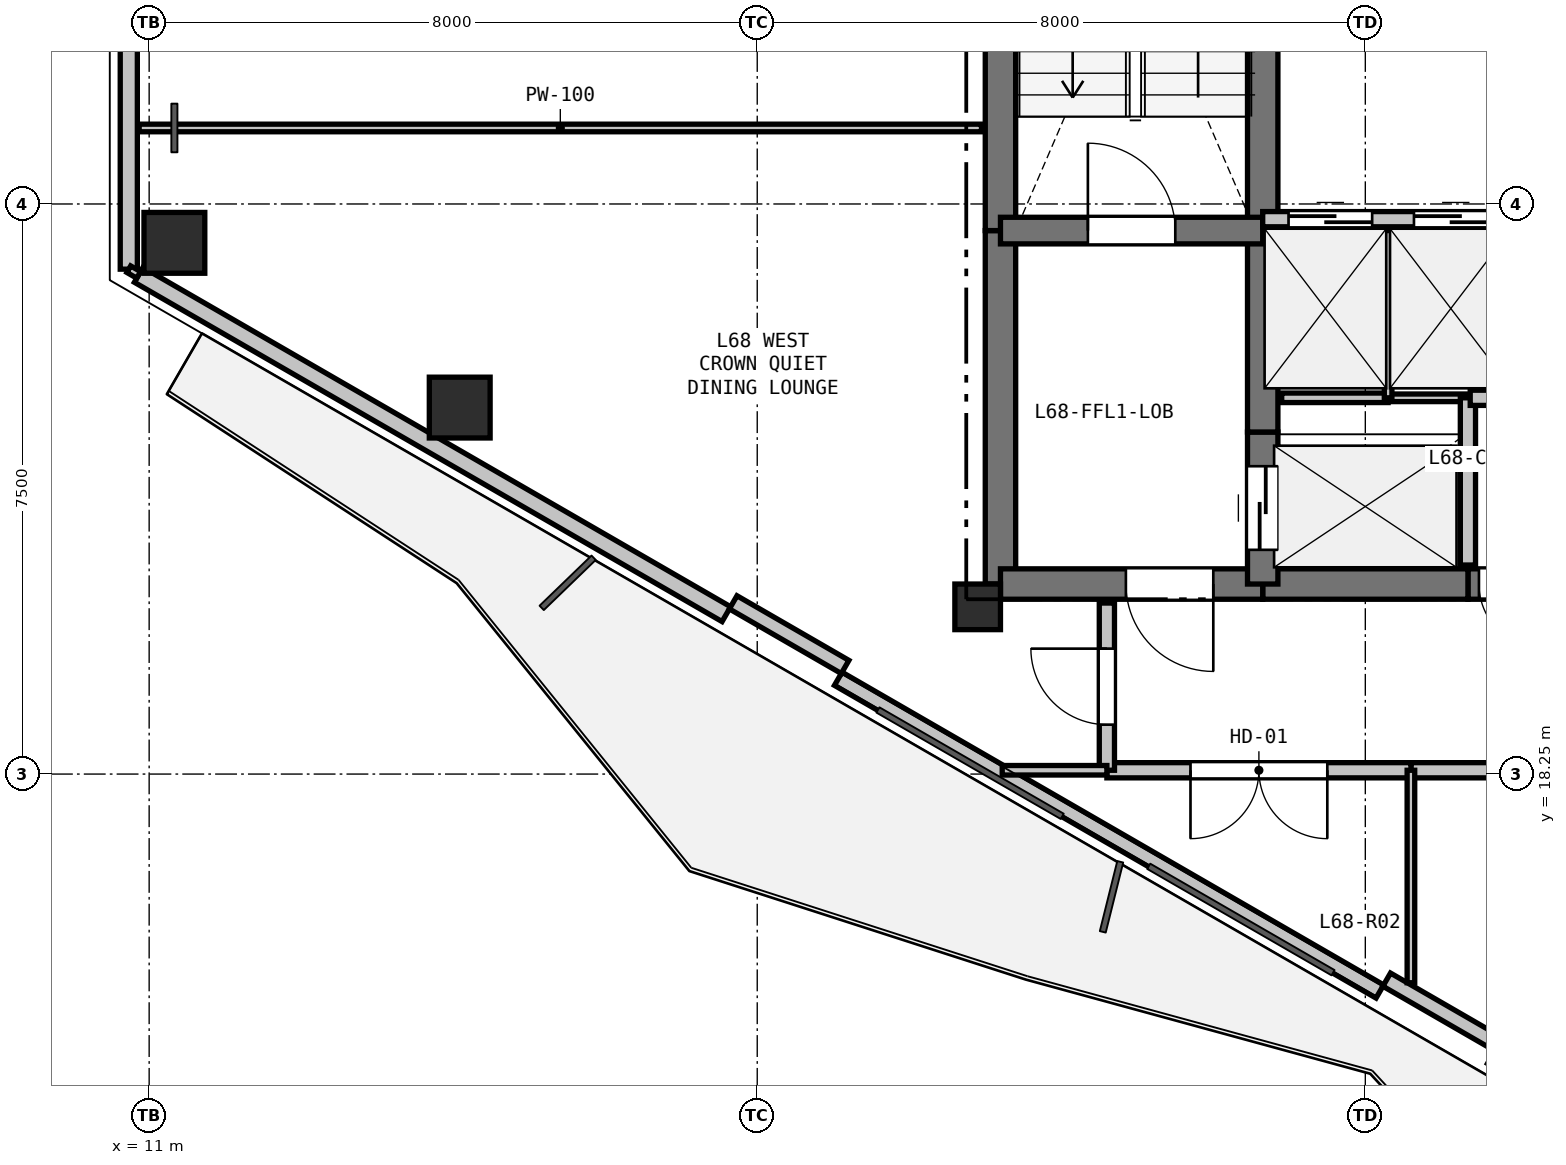
"""IFC4 building model, lengths in metres.
Left out: names, types, materials, properties, quantities, classifications, styles, units other than length and angle.
Written with IfcOpenShell. Run it as: python <this file> out.ifc"""

import sys

from ifc_helpers import new_model, si_unit, direction, frame, frame_2d, origin, origin_2d, place, context, subcontext, project, spatial, rectangle, hollow_rectangle, extrude, element, fill, save


model = new_model("IFC4")
c1 = context("Model", 3, precision=1e-05, world=origin(), true_north=direction((0.0, 1.0)))
c2 = subcontext(c1, "Body", "Model", "MODEL_VIEW")
j1 = project(units=[si_unit("LENGTHUNIT", "METRE"), si_unit("PLANEANGLEUNIT", "RADIAN")], contexts=[c1])
p1 = place(None, origin())
s1 = spatial("IfcSite", under=j1, at=p1, CompositionType="ELEMENT")
p2 = place(p1, origin())
s2 = spatial("IfcBuilding", under=s1, at=p2, CompositionType="ELEMENT")
p3 = place(p2, frame((0.0, 0.0, 243.0)))
s3 = spatial("IfcBuildingStorey", under=s2, at=p3, CompositionType="ELEMENT", Elevation=243.0)
p4 = place(p3, frame((21.9, 20.45, 0.0), z_axis=(0.0, 0.0, 1.0), x_axis=(1.0, 0.0, 0.0)))
e1 = element("IfcColumn", 1, at=p4, inside=s3, PredefinedType="COLUMN", context=c2, shape_type="SweptSolid", body=[
    extrude(rectangle(XDim=0.6, YDim=0.6, at=origin_2d()), origin(), (0.0, 0.0, 1.0), 3.3),
])
for number, where, z_axis, x_axis in (
    (2, (15.086, 23.072, 0.0), (0.0, 0.0, 1.0), (1.0, 0.0, 0.0)),
    (3, (11.332, 25.239, 0.0), (0.0, 0.0, 1.0), (1.0, 0.0, 0.0)),
):
    element("IfcColumn", number, at=place(p3, frame(where, z_axis=z_axis, x_axis=x_axis)), inside=s3, PredefinedType="COLUMN", context=c2, shape_type="SweptSolid", body=[
        extrude(hollow_rectangle(XDim=0.8, YDim=0.8, WallThickness=0.025, at=origin_2d()), origin(), (0.0, 0.0, 1.0), 3.3),
    ])
p5 = place(p3, frame((10.732, 24.892, 0.0), z_axis=(0.0, 0.0, 1.0), x_axis=(0.0, 1.0, 0.0)))
e4 = element("IfcWall", 4, at=p5, inside=s3, PredefinedType="SOLIDWALL", context=c2, shape_type="SweptSolid", body=[
    extrude(rectangle(XDim=3.715, YDim=0.225, at=frame_2d((1.858, 0.0))), origin(), (0.0, 0.0, 1.0), 2.7),
])
p6 = place(p3, frame((27.191, 15.389, 0.0), z_axis=(0.0, 0.0, 1.0), x_axis=(-0.866019557082, 0.500010126649, 0.0)))
e5 = element("IfcWall", 5, at=p6, inside=s3, PredefinedType="PARAPET", context=c2, shape_type="SweptSolid", body=[
    extrude(rectangle(XDim=8.228, YDim=0.2, at=frame_2d((4.114, 0.0))), origin(), (0.0, 0.0, 1.0), 0.2),
])
p7 = place(p3, frame((18.594, 20.354, 0.0), z_axis=(0.0, 0.0, 1.0), x_axis=(-0.866026655105, 0.499997832642, 0.0)))
e6 = element("IfcWall", 6, at=p7, inside=s3, PredefinedType="SOLIDWALL", context=c2, shape_type="SweptSolid", body=[
    extrude(rectangle(XDim=8.928, YDim=0.225, at=frame_2d((4.464, 0.0))), origin(), (0.0, 0.0, 1.0), 2.7),
])
for number, where, z_axis, x_axis in (
    (7, (28.754, 14.695, 0.0), (0.0, 0.0, 1.0), (-0.866, 0.5, 0.0)),
    (8, (20.156, 19.659, 0.0), (0.0, 0.0, 1.0), (-0.866, 0.5, 0.0)),
):
    element("IfcWall", number, at=place(p3, frame(where, z_axis=z_axis, x_axis=x_axis)), inside=s3, PredefinedType="PARAPET", context=c2, shape_type="SweptSolid", body=[
        extrude(rectangle(XDim=1.7, YDim=0.2, at=frame_2d((0.85, 0.0))), origin(), (0.0, 0.0, 1.0), 2.7),
    ])
p8 = place(p3, frame((22.2, 20.75, 0.0), z_axis=(0.0, 0.0, 1.0), x_axis=(0.0, 1.0, 0.0)))
e9 = element("IfcWall", 9, at=p8, inside=s3, PredefinedType="SHEAR", context=c2, shape_type="SweptSolid", body=[
    extrude(rectangle(XDim=4.65, YDim=0.4, at=frame_2d((2.325, 0.0))), origin(), (0.0, 0.0, 1.0), 3.08),
])
p9 = place(p3, frame((22.2, 25.4, 0.0), z_axis=(0.0, 0.0, 1.0), x_axis=(0.0, 1.0, 0.0)))
e10 = element("IfcWall", 10, at=p9, inside=s3, PredefinedType="SHEAR", context=c2, shape_type="SweptSolid", body=[
    extrude(rectangle(XDim=7.35, YDim=0.4, at=frame_2d((3.675, 0.0))), origin(), (0.0, 0.0, 1.0), 3.08),
])
p10 = place(p3, frame((30.6, 20.75, 0.0), z_axis=(0.0, 0.0, 1.0), x_axis=(-1.0, 0.0, 0.0)))
e11 = element("IfcWall", 11, at=p10, inside=s3, PredefinedType="SHEAR", context=c2, shape_type="SweptSolid", body=[
    extrude(rectangle(XDim=2.25, YDim=0.4, at=frame_2d((1.125, 0.0))), origin(), (0.0, 0.0, 1.0), 3.08),
])
p11 = place(p10, frame((1.255, 0.0, 0.0)))
e12 = element("IfcOpeningElement", 12, at=p11, cuts=e11, PredefinedType="OPENING", context=c2, shape_type="SweptSolid", body=[
    extrude(rectangle(XDim=0.85, YDim=2.1, at=frame_2d((0.425, 1.05))), frame((0.0, 0.21, 0.0), z_axis=(0.0, -1.0, 0.0), x_axis=(1.0, 0.0, 0.0)), (0.0, 0.0, 1.0), 0.42),
])
p12 = place(p10, frame((0.17, 0.0, 0.0)))
e13 = element("IfcOpeningElement", 13, at=p12, cuts=e11, PredefinedType="OPENING", context=c2, shape_type="SweptSolid", body=[
    extrude(rectangle(XDim=0.85, YDim=2.1, at=frame_2d((0.425, 1.05))), frame((0.0, 0.21, 0.0), z_axis=(0.0, -1.0, 0.0), x_axis=(1.0, 0.0, 0.0)), (0.0, 0.0, 1.0), 0.42),
])
p13 = place(p3, frame((28.35, 20.75, 0.0), z_axis=(0.0, 0.0, 1.0), x_axis=(-1.0, 0.0, 0.0)))
e14 = element("IfcWall", 14, at=p13, inside=s3, PredefinedType="SHEAR", context=c2, shape_type="SweptSolid", body=[
    extrude(rectangle(XDim=2.7, YDim=0.4, at=frame_2d((1.35, 0.0))), origin(), (0.0, 0.0, 1.0), 3.08),
])
p14 = place(p3, frame((25.65, 20.75, 0.0), z_axis=(0.0, 0.0, 1.0), x_axis=(-1.0, 0.0, 0.0)))
e15 = element("IfcWall", 15, at=p14, inside=s3, PredefinedType="SHEAR", context=c2, shape_type="SweptSolid", body=[
    extrude(rectangle(XDim=3.45, YDim=0.4, at=frame_2d((1.725, 0.0))), origin(), (0.0, 0.0, 1.0), 3.08),
])
p15 = place(p14, frame((0.65, 0.0, 0.0)))
e16 = element("IfcOpeningElement", 16, at=p15, cuts=e15, PredefinedType="OPENING", context=c2, shape_type="SweptSolid", body=[
    extrude(rectangle(XDim=1.15, YDim=2.15, at=frame_2d((0.575, 1.075))), frame((0.0, 0.21, 0.0), z_axis=(0.0, -1.0, 0.0), x_axis=(1.0, 0.0, 0.0)), (0.0, 0.0, 1.0), 0.42),
])
p16 = place(p3, frame((25.65, 20.75, 0.0), z_axis=(0.0, 0.0, 1.0), x_axis=(0.0, 1.0, 0.0)))
e17 = element("IfcWall", 17, at=p16, inside=s3, PredefinedType="SHEAR", context=c2, shape_type="SweptSolid", body=[
    extrude(rectangle(XDim=2.0, YDim=0.4, at=frame_2d((1.0, 0.0))), origin(), (0.0, 0.0, 1.0), 3.08),
])
p17 = place(p16, frame((0.45, 0.0, 0.0)))
e18 = element("IfcOpeningElement", 18, at=p17, cuts=e17, PredefinedType="OPENING", context=c2, shape_type="SweptSolid", body=[
    extrude(rectangle(XDim=1.1, YDim=2.15, at=frame_2d((0.55, 1.075))), frame((0.0, 0.21, 0.0), z_axis=(0.0, -1.0, 0.0), x_axis=(1.0, 0.0, 0.0)), (0.0, 0.0, 1.0), 0.42),
])
p18 = place(p3, frame((25.65, 22.75, 0.0), z_axis=(0.0, 0.0, 1.0), x_axis=(0.0, 1.0, 0.0)))
e19 = element("IfcWall", 19, at=p18, inside=s3, PredefinedType="SHEAR", context=c2, shape_type="SweptSolid", body=[
    extrude(rectangle(XDim=2.8, YDim=0.4, at=frame_2d((1.4, 0.0))), origin(), (0.0, 0.0, 1.0), 3.08),
])
p19 = place(p3, frame((25.65, 25.55, 0.0), z_axis=(0.0, 0.0, 1.0), x_axis=(0.0, 1.0, 0.0)))
e20 = element("IfcWall", 20, at=p19, inside=s3, PredefinedType="SHEAR", context=c2, shape_type="SweptSolid", body=[
    extrude(rectangle(XDim=2.4, YDim=0.4, at=frame_2d((1.2, 0.0))), origin(), (0.0, 0.0, 1.0), 3.08),
])
p20 = place(p3, frame((22.2, 25.4, 0.0), z_axis=(0.0, 0.0, 1.0), x_axis=(1.0, 0.0, 0.0)))
e21 = element("IfcWall", 21, at=p20, inside=s3, PredefinedType="SHEAR", context=c2, shape_type="SweptSolid", body=[
    extrude(rectangle(XDim=3.45, YDim=0.35, at=frame_2d((1.725, 0.0))), origin(), (0.0, 0.0, 1.0), 3.08),
])
p21 = place(p20, frame((1.15, 0.0, 0.0)))
e22 = element("IfcOpeningElement", 22, at=p21, cuts=e21, PredefinedType="OPENING", context=c2, shape_type="SweptSolid", body=[
    extrude(rectangle(XDim=1.15, YDim=2.15, at=frame_2d((0.575, 1.075))), frame((0.0, 0.185, 0.0), z_axis=(0.0, -1.0, 0.0), x_axis=(1.0, 0.0, 0.0)), (0.0, 0.0, 1.0), 0.37),
])
p22 = place(p3, frame((25.65, 25.55, 0.0), z_axis=(0.0, 0.0, 1.0), x_axis=(1.0, 0.0, 0.0)))
e23 = element("IfcWall", 23, at=p22, inside=s3, PredefinedType="PARTITIONING", context=c2, shape_type="SweptSolid", body=[
    extrude(rectangle(XDim=4.95, YDim=0.2, at=frame_2d((2.475, 0.0))), origin(), (0.0, 0.0, 1.0), 3.08),
])
p23 = place(p22, frame((0.34, 0.0, 0.0)))
e24 = element("IfcOpeningElement", 24, at=p23, cuts=e23, PredefinedType="OPENING", context=c2, shape_type="SweptSolid", body=[
    extrude(rectangle(XDim=1.1, YDim=2.15, at=frame_2d((0.55, 1.075))), frame((0.0, 0.11, 0.0), z_axis=(0.0, -1.0, 0.0), x_axis=(1.0, 0.0, 0.0)), (0.0, 0.0, 1.0), 0.22),
])
p24 = place(p22, frame((1.99, 0.0, 0.0)))
e25 = element("IfcOpeningElement", 25, at=p24, cuts=e23, PredefinedType="OPENING", context=c2, shape_type="SweptSolid", body=[
    extrude(rectangle(XDim=1.1, YDim=2.15, at=frame_2d((0.55, 1.075))), frame((0.0, 0.11, 0.0), z_axis=(0.0, -1.0, 0.0), x_axis=(1.0, 0.0, 0.0)), (0.0, 0.0, 1.0), 0.22),
])
p25 = place(p22, frame((3.64, 0.0, 0.0)))
e26 = element("IfcOpeningElement", 26, at=p25, cuts=e23, PredefinedType="OPENING", context=c2, shape_type="SweptSolid", body=[
    extrude(rectangle(XDim=1.1, YDim=2.15, at=frame_2d((0.55, 1.075))), frame((0.0, 0.11, 0.0), z_axis=(0.0, -1.0, 0.0), x_axis=(1.0, 0.0, 0.0)), (0.0, 0.0, 1.0), 0.22),
])
p26 = place(p3, frame((25.9, 23.2, 0.0), z_axis=(0.0, 0.0, 1.0), x_axis=(1.0, 0.0, 0.0)))
e27 = element("IfcWall", 27, at=p26, inside=s3, PredefinedType="PARTITIONING", context=c2, shape_type="SweptSolid", body=[
    extrude(rectangle(XDim=1.4, YDim=0.125, at=frame_2d((0.7, 0.0))), origin(), (0.0, 0.0, 1.0), 3.08),
])
p27 = place(p3, frame((27.3, 23.2, 0.0), z_axis=(0.0, 0.0, 1.0), x_axis=(1.0, 0.0, 0.0)))
e28 = element("IfcWall", 28, at=p27, inside=s3, PredefinedType="PARTITIONING", context=c2, shape_type="SweptSolid", body=[
    extrude(rectangle(XDim=1.05, YDim=0.1, at=frame_2d((0.525, 0.0))), origin(), (0.0, 0.0, 1.0), 3.08),
])
p28 = place(p3, frame((28.35, 23.2, 0.0), z_axis=(0.0, 0.0, 1.0), x_axis=(0.0, -1.0, 0.0)))
e29 = element("IfcWall", 29, at=p28, inside=s3, PredefinedType="PARTITIONING", context=c2, shape_type="SweptSolid", body=[
    extrude(rectangle(XDim=2.2, YDim=0.2, at=frame_2d((1.1, 0.0))), origin(), (0.0, 0.0, 1.0), 3.08),
])
p29 = place(p3, frame((27.3, 25.4, 0.0), z_axis=(0.0, 0.0, 1.0), x_axis=(0.0, -1.0, 0.0)))
e30 = element("IfcWall", 30, at=p29, inside=s3, PredefinedType="PARTITIONING", context=c2, shape_type="SweptSolid", body=[
    extrude(rectangle(XDim=2.2, YDim=0.1, at=frame_2d((1.1, 0.0))), origin(), (0.0, 0.0, 1.0), 3.08),
])
p30 = place(p3, frame((28.95, 23.2, 0.0), z_axis=(0.0, 0.0, 1.0), x_axis=(-1.0, 0.0, 0.0)))
e31 = element("IfcWall", 31, at=p30, inside=s3, PredefinedType="PARTITIONING", context=c2, shape_type="SweptSolid", body=[
    extrude(rectangle(XDim=0.57, YDim=0.2, at=frame_2d((0.285, 0.0))), origin(), (0.0, 0.0, 1.0), 3.08),
])
p31 = place(p3, frame((33.5, 18.3, 0.0), z_axis=(0.0, 0.0, 1.0), x_axis=(-1.0, 0.0, 0.0)))
e32 = element("IfcWall", 32, at=p31, inside=s3, PredefinedType="PARTITIONING", context=c2, shape_type="SweptSolid", body=[
    extrude(rectangle(XDim=5.9, YDim=0.2, at=frame_2d((2.95, 0.0))), origin(), (0.0, 0.0, 1.0), 3.08),
])
p32 = place(p31, frame((2.45, 0.0, 0.0)))
e33 = element("IfcOpeningElement", 33, at=p32, cuts=e32, PredefinedType="OPENING", context=c2, shape_type="SweptSolid", body=[
    extrude(rectangle(XDim=1.0, YDim=2.15, at=frame_2d((0.5, 1.075))), frame((0.0, 0.11, 0.0), z_axis=(0.0, -1.0, 0.0), x_axis=(1.0, 0.0, 0.0)), (0.0, 0.0, 1.0), 0.22),
])
p33 = place(p3, frame((27.6, 18.3, 0.0), z_axis=(0.0, 0.0, 1.0), x_axis=(-1.0, 0.0, 0.0)))
e34 = element("IfcWall", 34, at=p33, inside=s3, PredefinedType="PARTITIONING", context=c2, shape_type="SweptSolid", body=[
    extrude(rectangle(XDim=4.0, YDim=0.2, at=frame_2d((2.0, 0.0))), origin(), (0.0, 0.0, 1.0), 2.365),
])
p34 = place(p33, frame((1.1, 0.0, 0.0)))
e35 = element("IfcOpeningElement", 35, at=p34, cuts=e34, PredefinedType="OPENING", context=c2, shape_type="SweptSolid", body=[
    extrude(rectangle(XDim=1.8, YDim=2.2, at=frame_2d((0.9, 1.1))), frame((0.0, 0.11, 0.0), z_axis=(0.0, -1.0, 0.0), x_axis=(1.0, 0.0, 0.0)), (0.0, 0.0, 1.0), 0.22),
])
p35 = place(p3, frame((23.6, 18.3, 0.0), z_axis=(0.0, 0.0, 1.0), x_axis=(0.0, 1.0, 0.0)))
e36 = element("IfcWall", 36, at=p35, inside=s3, PredefinedType="PARTITIONING", context=c2, shape_type="SweptSolid", body=[
    extrude(rectangle(XDim=2.2, YDim=0.2, at=frame_2d((1.1, 0.0))), origin(), (0.0, 0.0, 1.0), 2.528),
])
p36 = place(p35, frame((0.6, 0.0, 0.0)))
e37 = element("IfcOpeningElement", 37, at=p36, cuts=e36, PredefinedType="OPENING", context=c2, shape_type="SweptSolid", body=[
    extrude(rectangle(XDim=1.0, YDim=2.15, at=frame_2d((0.5, 1.075))), frame((0.0, 0.11, 0.0), z_axis=(0.0, -1.0, 0.0), x_axis=(1.0, 0.0, 0.0)), (0.0, 0.0, 1.0), 0.22),
])
p37 = place(p3, frame((22.223, 18.3, 0.0), z_axis=(0.0, 0.0, 1.0), x_axis=(1.0, 0.0, 0.0)))
e38 = element("IfcWall", 38, at=p37, inside=s3, PredefinedType="PARTITIONING", context=c2, shape_type="SweptSolid", body=[
    extrude(rectangle(XDim=1.377, YDim=0.125, at=frame_2d((0.688, 0.0))), origin(), (0.0, 0.0, 1.0), 2.365),
])
p38 = place(p3, frame((27.6, 18.3, 0.0), z_axis=(0.0, 0.0, 1.0), x_axis=(0.0, -1.0, 0.0)))
e39 = element("IfcWall", 39, at=p38, inside=s3, PredefinedType="PARTITIONING", context=c2, shape_type="SweptSolid", body=[
    extrude(rectangle(XDim=2.795, YDim=0.1, at=frame_2d((1.398, 0.0))), origin(), (0.0, 0.0, 1.0), 2.365),
])
p39 = place(p3, frame((21.95, 26.75, 0.0), z_axis=(0.0, 0.0, 1.0), x_axis=(-1.0, 0.0, 0.0)))
e40 = element("IfcWall", 40, at=p39, inside=s3, PredefinedType="PARTITIONING", context=c2, shape_type="SweptSolid", body=[
    extrude(rectangle(XDim=11.082, YDim=0.1, at=frame_2d((5.541, 0.0))), origin(), (0.0, 0.0, 1.0), 2.605),
])
p40 = place(p3, frame((10.862, 24.817, 0.0), z_axis=(0.0, 0.0, 1.0), x_axis=(-0.866131372301, 0.499816412211, 0.0)))
e41 = element("IfcWall", 41, at=p40, inside=s3, PredefinedType="PARTITIONING", context=c2, shape_type="SweptSolid", body=[
    extrude(rectangle(XDim=0.15, YDim=0.1, at=frame_2d((0.075, 0.0))), origin(), (0.0, 0.0, 1.0), 3.08),
])
p41 = place(p23, origin())
e42 = element("IfcDoor", 42, at=p41, inside=s3, OperationType="SLIDING_TO_LEFT", PredefinedType="DOOR", context=c2, shape_type="SweptSolid", body=[
    extrude(rectangle(XDim=1.1, YDim=2.15, at=frame_2d((0.55, 1.075))), frame((0.0, 0.025, 0.0), z_axis=(0.0, -1.0, 0.0), x_axis=(1.0, 0.0, 0.0)), (0.0, 0.0, 1.0), 0.05),
])
fill(e24, e42)
p42 = place(p24, origin())
e43 = element("IfcDoor", 43, at=p42, inside=s3, OperationType="SLIDING_TO_LEFT", PredefinedType="DOOR", context=c2, shape_type="SweptSolid", body=[
    extrude(rectangle(XDim=1.1, YDim=2.15, at=frame_2d((0.55, 1.075))), frame((0.0, 0.025, 0.0), z_axis=(0.0, -1.0, 0.0), x_axis=(1.0, 0.0, 0.0)), (0.0, 0.0, 1.0), 0.05),
])
fill(e25, e43)
p43 = place(p17, origin())
e44 = element("IfcDoor", 44, at=p43, inside=s3, OperationType="SLIDING_TO_LEFT", PredefinedType="DOOR", context=c2, shape_type="SweptSolid", body=[
    extrude(rectangle(XDim=1.1, YDim=2.15, at=frame_2d((0.55, 1.075))), frame((0.0, 0.025, 0.0), z_axis=(0.0, -1.0, 0.0), x_axis=(1.0, 0.0, 0.0)), (0.0, 0.0, 1.0), 0.05),
])
fill(e18, e44)
p44 = place(p21, origin())
e45 = element("IfcDoor", 45, at=p44, inside=s3, OperationType="SINGLE_SWING_LEFT", PredefinedType="DOOR", context=c2, shape_type="SweptSolid", body=[
    extrude(rectangle(XDim=1.15, YDim=2.15, at=frame_2d((0.575, 1.075))), frame((0.0, 0.025, 0.0), z_axis=(0.0, -1.0, 0.0), x_axis=(1.0, 0.0, 0.0)), (0.0, 0.0, 1.0), 0.05),
])
fill(e22, e45)
p45 = place(p15, origin())
e46 = element("IfcDoor", 46, at=p45, inside=s3, OperationType="SINGLE_SWING_LEFT", PredefinedType="DOOR", context=c2, shape_type="SweptSolid", body=[
    extrude(rectangle(XDim=1.15, YDim=2.15, at=frame_2d((0.575, 1.075))), frame((0.0, 0.025, 0.0), z_axis=(0.0, -1.0, 0.0), x_axis=(1.0, 0.0, 0.0)), (0.0, 0.0, 1.0), 0.05),
])
fill(e16, e46)
p46 = place(p11, origin())
e47 = element("IfcDoor", 47, at=p46, inside=s3, OperationType="SINGLE_SWING_LEFT", PredefinedType="DOOR", context=c2, shape_type="SweptSolid", body=[
    extrude(rectangle(XDim=0.85, YDim=2.1, at=frame_2d((0.425, 1.05))), frame((0.0, 0.025, 0.0), z_axis=(0.0, -1.0, 0.0), x_axis=(1.0, 0.0, 0.0)), (0.0, 0.0, 1.0), 0.05),
])
fill(e12, e47)
p47 = place(p34, origin())
e48 = element("IfcDoor", 48, at=p47, inside=s3, OperationType="DOUBLE_DOOR_SINGLE_SWING", PredefinedType="DOOR", context=c2, shape_type="SweptSolid", body=[
    extrude(rectangle(XDim=1.8, YDim=2.2, at=frame_2d((0.9, 1.1))), frame((0.0, 0.025, 0.0), z_axis=(0.0, -1.0, 0.0), x_axis=(1.0, 0.0, 0.0)), (0.0, 0.0, 1.0), 0.05),
])
fill(e35, e48)
p48 = place(p36, origin())
e49 = element("IfcDoor", 49, at=p48, inside=s3, OperationType="SINGLE_SWING_RIGHT", PredefinedType="DOOR", context=c2, shape_type="SweptSolid", body=[
    extrude(rectangle(XDim=1.0, YDim=2.15, at=frame_2d((0.5, 1.075))), frame((0.0, 0.025, 0.0), z_axis=(0.0, -1.0, 0.0), x_axis=(1.0, 0.0, 0.0)), (0.0, 0.0, 1.0), 0.05),
])
fill(e37, e49)
save(model, sys.argv[1])
